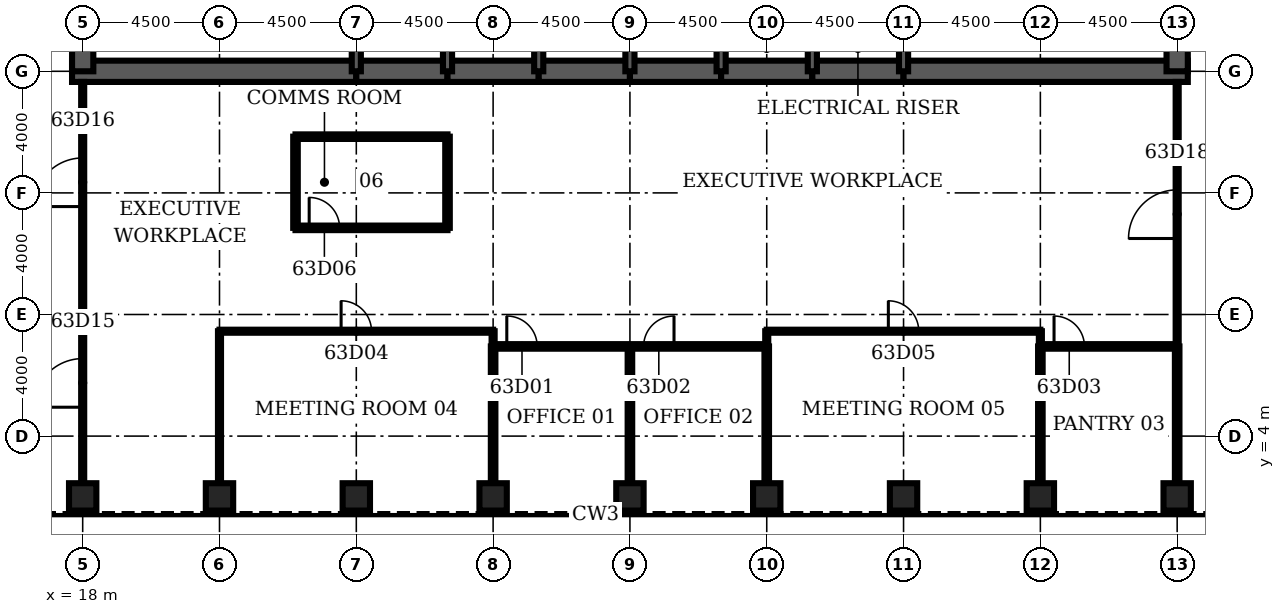
"""IFC4 building model, lengths in metres.
Left out: names, types, materials, properties, quantities, classifications, styles, units other than length and angle.
Written with IfcOpenShell. Run it as: python <this file> out.ifc"""

import sys

from ifc_helpers import new_model, si_unit, direction, frame, frame_2d, origin, origin_2d, place, context, subcontext, project, spatial, rectangle, hollow_rectangle, extrude, element, fill, save


model = new_model("IFC4")
c1 = context("Model", 3, precision=1e-05, world=origin(), true_north=direction((0.0, 1.0)))
c2 = subcontext(c1, "Body", "Model", "MODEL_VIEW")
j1 = project(units=[si_unit("LENGTHUNIT", "METRE"), si_unit("PLANEANGLEUNIT", "RADIAN")], contexts=[c1])
p1 = place(None, origin())
s1 = spatial("IfcSite", under=j1, at=p1, CompositionType="ELEMENT")
p2 = place(p1, origin())
s2 = spatial("IfcBuilding", under=s1, at=p2, CompositionType="ELEMENT")
p3 = place(p2, frame((0.0, 0.0, 279.5)))
s3 = spatial("IfcBuildingStorey", under=s2, at=p3, CompositionType="ELEMENT", Elevation=279.5)
for number, where, z_axis, x_axis in (
    (1, (18.0, 2.0, 0.0), (0.0, 0.0, 1.0), (0.0, 1.0, 0.0)),
    (2, (22.5, 2.0, 0.0), (0.0, 0.0, 1.0), (0.0, 1.0, 0.0)),
    (3, (27.0, 2.0, 0.0), (0.0, 0.0, 1.0), (0.0, 1.0, 0.0)),
    (4, (31.5, 2.0, 0.0), (0.0, 0.0, 1.0), (0.0, 1.0, 0.0)),
    (5, (36.0, 2.0, 0.0), (0.0, 0.0, 1.0), (0.0, 1.0, 0.0)),
    (6, (40.5, 2.0, 0.0), (0.0, 0.0, 1.0), (0.0, 1.0, 0.0)),
    (7, (45.0, 2.0, 0.0), (0.0, 0.0, 1.0), (0.0, 1.0, 0.0)),
    (8, (49.5, 2.0, 0.0), (0.0, 0.0, 1.0), (0.0, 1.0, 0.0)),
    (9, (54.0, 2.0, 0.0), (0.0, 0.0, 1.0), (0.0, 1.0, 0.0)),
):
    element("IfcColumn", number, at=place(p3, frame(where, z_axis=z_axis, x_axis=x_axis)), inside=s3, PredefinedType="COLUMN", context=c2, shape_type="SweptSolid", body=[
        extrude(hollow_rectangle(XDim=0.9, YDim=0.9, WallThickness=0.07, at=origin_2d()), origin(), (0.0, 0.0, 1.0), 4.2),
    ])
p4 = place(p3, frame((17.65, 16.0, 0.0), z_axis=(0.0, 0.0, 1.0), x_axis=(1.0, 0.0, 0.0)))
e10 = element("IfcWall", 10, at=p4, inside=s3, PredefinedType="SHEAR", context=c2, shape_type="SweptSolid", body=[
    extrude(rectangle(XDim=9.35, YDim=0.7, at=frame_2d((4.675, 0.0))), origin(), (0.0, 0.0, 1.0), 4.2),
])
for number, where, z_axis, x_axis in (
    (11, (27.0, 16.0, 0.0), (0.0, 0.0, 1.0), (1.0, 0.0, 0.0)),
    (12, (30.0, 16.0, 0.0), (0.0, 0.0, 1.0), (1.0, 0.0, 0.0)),
    (13, (33.0, 16.0, 0.0), (0.0, 0.0, 1.0), (1.0, 0.0, 0.0)),
    (14, (36.0, 16.0, 0.0), (0.0, 0.0, 1.0), (1.0, 0.0, 0.0)),
    (15, (39.0, 16.0, 0.0), (0.0, 0.0, 1.0), (1.0, 0.0, 0.0)),
    (16, (42.0, 16.0, 0.0), (0.0, 0.0, 1.0), (1.0, 0.0, 0.0)),
):
    element("IfcWall", number, at=place(p3, frame(where, z_axis=z_axis, x_axis=x_axis)), inside=s3, PredefinedType="SHEAR", context=c2, shape_type="SweptSolid", body=[
        extrude(rectangle(XDim=3.0, YDim=0.7, at=frame_2d((1.5, 0.0))), origin(), (0.0, 0.0, 1.0), 4.2),
    ])
p5 = place(p3, frame((45.0, 16.0, 0.0), z_axis=(0.0, 0.0, 1.0), x_axis=(1.0, 0.0, 0.0)))
e17 = element("IfcWall", 17, at=p5, inside=s3, PredefinedType="SHEAR", context=c2, shape_type="SweptSolid", body=[
    extrude(rectangle(XDim=9.35, YDim=0.7, at=frame_2d((4.675, 0.0))), origin(), (0.0, 0.0, 1.0), 4.2),
])
for number, where, z_axis, x_axis in (
    (18, (18.0, 19.2, 0.0), (0.0, 0.0, 1.0), (0.0, -1.0, 0.0)),
    (19, (54.0, 16.0, 0.0), (0.0, 0.0, 1.0), (0.0, 1.0, 0.0)),
):
    element("IfcWall", number, at=place(p3, frame(where, z_axis=z_axis, x_axis=x_axis)), inside=s3, PredefinedType="SHEAR", context=c2, shape_type="SweptSolid", body=[
        extrude(rectangle(XDim=3.2, YDim=0.7, at=frame_2d((1.6, 0.0))), origin(), (0.0, 0.0, 1.0), 4.2),
    ])
for number, where, z_axis, x_axis in (
    (20, (27.0, 16.0, 0.0), (0.0, 0.0, 1.0), (0.0, 1.0, 0.0)),
    (21, (30.0, 16.0, 0.0), (0.0, 0.0, 1.0), (0.0, 1.0, 0.0)),
    (22, (33.0, 16.0, 0.0), (0.0, 0.0, 1.0), (0.0, 1.0, 0.0)),
    (23, (36.0, 16.0, 0.0), (0.0, 0.0, 1.0), (0.0, 1.0, 0.0)),
    (24, (39.0, 16.0, 0.0), (0.0, 0.0, 1.0), (0.0, 1.0, 0.0)),
    (25, (42.0, 16.0, 0.0), (0.0, 0.0, 1.0), (0.0, 1.0, 0.0)),
    (26, (45.0, 16.0, 0.0), (0.0, 0.0, 1.0), (0.0, 1.0, 0.0)),
):
    element("IfcWall", number, at=place(p3, frame(where, z_axis=z_axis, x_axis=x_axis)), inside=s3, PredefinedType="SOLIDWALL", context=c2, shape_type="SweptSolid", body=[
        extrude(rectangle(XDim=3.2, YDim=0.3, at=frame_2d((1.6, 0.0))), origin(), (0.0, 0.0, 1.0), 4.2),
    ])
p6 = place(p3, frame((31.5, 6.95, 0.0), z_axis=(0.0, 0.0, 1.0), x_axis=(1.0, 0.0, 0.0)))
e27 = element("IfcWall", 27, at=p6, inside=s3, PredefinedType="PARTITIONING", context=c2, shape_type="SweptSolid", body=[
    extrude(rectangle(XDim=9.0, YDim=0.15, at=frame_2d((4.5, 0.0))), origin(), (0.0, 0.0, 1.0), 3.0),
])
p7 = place(p6, frame((0.45, 0.0, 0.0)))
e28 = element("IfcOpeningElement", 28, at=p7, cuts=e27, PredefinedType="OPENING", context=c2, shape_type="SweptSolid", body=[
    extrude(rectangle(XDim=1.0, YDim=2.1, at=frame_2d((0.5, 1.05))), frame((0.0, 0.085, 0.0), z_axis=(0.0, -1.0, 0.0), x_axis=(1.0, 0.0, 0.0)), (0.0, 0.0, 1.0), 0.17),
])
p8 = place(p6, frame((4.95, 0.0, 0.0)))
e29 = element("IfcOpeningElement", 29, at=p8, cuts=e27, PredefinedType="OPENING", context=c2, shape_type="SweptSolid", body=[
    extrude(rectangle(XDim=1.0, YDim=2.1, at=frame_2d((0.5, 1.05))), frame((0.0, 0.085, 0.0), z_axis=(0.0, -1.0, 0.0), x_axis=(1.0, 0.0, 0.0)), (0.0, 0.0, 1.0), 0.17),
])
p9 = place(p3, frame((49.5, 6.95, 0.0), z_axis=(0.0, 0.0, 1.0), x_axis=(1.0, 0.0, 0.0)))
e30 = element("IfcWall", 30, at=p9, inside=s3, PredefinedType="PARTITIONING", context=c2, shape_type="SweptSolid", body=[
    extrude(rectangle(XDim=4.5, YDim=0.15, at=frame_2d((2.25, 0.0))), origin(), (0.0, 0.0, 1.0), 3.0),
])
p10 = place(p9, frame((0.45, 0.0, 0.0)))
e31 = element("IfcOpeningElement", 31, at=p10, cuts=e30, PredefinedType="OPENING", context=c2, shape_type="SweptSolid", body=[
    extrude(rectangle(XDim=1.0, YDim=2.1, at=frame_2d((0.5, 1.05))), frame((0.0, 0.085, 0.0), z_axis=(0.0, -1.0, 0.0), x_axis=(1.0, 0.0, 0.0)), (0.0, 0.0, 1.0), 0.17),
])
p11 = place(p3, frame((22.5, 7.45, 0.0), z_axis=(0.0, 0.0, 1.0), x_axis=(1.0, 0.0, 0.0)))
e32 = element("IfcWall", 32, at=p11, inside=s3, PredefinedType="PARTITIONING", context=c2, shape_type="SweptSolid", body=[
    extrude(rectangle(XDim=9.0, YDim=0.1, at=frame_2d((4.5, 0.0))), origin(), (0.0, 0.0, 1.0), 3.0),
])
p12 = place(p11, frame((4.0, 0.0, 0.0)))
e33 = element("IfcOpeningElement", 33, at=p12, cuts=e32, PredefinedType="OPENING", context=c2, shape_type="SweptSolid", body=[
    extrude(rectangle(XDim=1.0, YDim=2.1, at=frame_2d((0.5, 1.05))), frame((0.0, 0.06, 0.0), z_axis=(0.0, -1.0, 0.0), x_axis=(1.0, 0.0, 0.0)), (0.0, 0.0, 1.0), 0.12),
])
p13 = place(p3, frame((40.5, 7.45, 0.0), z_axis=(0.0, 0.0, 1.0), x_axis=(1.0, 0.0, 0.0)))
e34 = element("IfcWall", 34, at=p13, inside=s3, PredefinedType="PARTITIONING", context=c2, shape_type="SweptSolid", body=[
    extrude(rectangle(XDim=9.0, YDim=0.1, at=frame_2d((4.5, 0.0))), origin(), (0.0, 0.0, 1.0), 3.0),
])
p14 = place(p13, frame((4.0, 0.0, 0.0)))
e35 = element("IfcOpeningElement", 35, at=p14, cuts=e34, PredefinedType="OPENING", context=c2, shape_type="SweptSolid", body=[
    extrude(rectangle(XDim=1.0, YDim=2.1, at=frame_2d((0.5, 1.05))), frame((0.0, 0.06, 0.0), z_axis=(0.0, -1.0, 0.0), x_axis=(1.0, 0.0, 0.0)), (0.0, 0.0, 1.0), 0.12),
])
p15 = place(p3, frame((25.0, 10.85, 0.0), z_axis=(0.0, 0.0, 1.0), x_axis=(1.0, 0.0, 0.0)))
e36 = element("IfcWall", 36, at=p15, inside=s3, PredefinedType="PARTITIONING", context=c2, shape_type="SweptSolid", body=[
    extrude(rectangle(XDim=5.0, YDim=0.15, at=frame_2d((2.5, 0.0))), origin(), (0.0, 0.0, 1.0), 3.0),
])
p16 = place(p15, frame((0.45, 0.0, 0.0)))
e37 = element("IfcOpeningElement", 37, at=p16, cuts=e36, PredefinedType="OPENING", context=c2, shape_type="SweptSolid", body=[
    extrude(rectangle(XDim=1.0, YDim=2.1, at=frame_2d((0.5, 1.05))), frame((0.0, 0.085, 0.0), z_axis=(0.0, -1.0, 0.0), x_axis=(1.0, 0.0, 0.0)), (0.0, 0.0, 1.0), 0.17),
])
p17 = place(p3, frame((25.0, 13.85, 0.0), z_axis=(0.0, 0.0, 1.0), x_axis=(1.0, 0.0, 0.0)))
e38 = element("IfcWall", 38, at=p17, inside=s3, PredefinedType="PARTITIONING", context=c2, shape_type="SweptSolid", body=[
    extrude(rectangle(XDim=5.0, YDim=0.15, at=frame_2d((2.5, 0.0))), origin(), (0.0, 0.0, 1.0), 3.0),
])
p18 = place(p3, frame((18.0, 2.45, 0.0), z_axis=(0.0, 0.0, 1.0), x_axis=(0.0, 1.0, 0.0)))
e39 = element("IfcWall", 39, at=p18, inside=s3, PredefinedType="PARTITIONING", context=c2, shape_type="SweptSolid", body=[
    extrude(rectangle(XDim=13.2, YDim=0.1, at=frame_2d((6.6, 0.0))), origin(), (0.0, 0.0, 1.0), 3.0),
])
p19 = place(p18, frame((2.5, 0.0, 0.0)))
e40 = element("IfcOpeningElement", 40, at=p19, cuts=e39, PredefinedType="OPENING", context=c2, shape_type="SweptSolid", body=[
    extrude(rectangle(XDim=1.6, YDim=2.1, at=frame_2d((0.8, 1.05))), frame((0.0, 0.06, 0.0), z_axis=(0.0, -1.0, 0.0), x_axis=(1.0, 0.0, 0.0)), (0.0, 0.0, 1.0), 0.12),
])
p20 = place(p18, frame((9.1, 0.0, 0.0)))
e41 = element("IfcOpeningElement", 41, at=p20, cuts=e39, PredefinedType="OPENING", context=c2, shape_type="SweptSolid", body=[
    extrude(rectangle(XDim=1.6, YDim=2.1, at=frame_2d((0.8, 1.05))), frame((0.0, 0.06, 0.0), z_axis=(0.0, -1.0, 0.0), x_axis=(1.0, 0.0, 0.0)), (0.0, 0.0, 1.0), 0.12),
])
p21 = place(p3, frame((22.5, 2.45, 0.0), z_axis=(0.0, 0.0, 1.0), x_axis=(0.0, 1.0, 0.0)))
e42 = element("IfcWall", 42, at=p21, inside=s3, PredefinedType="PARTITIONING", context=c2, shape_type="SweptSolid", body=[
    extrude(rectangle(XDim=5.0, YDim=0.1, at=frame_2d((2.5, 0.0))), origin(), (0.0, 0.0, 1.0), 3.0),
])
for number, where, z_axis, x_axis in (
    (43, (25.0, 10.85, 0.0), (0.0, 0.0, 1.0), (0.0, 1.0, 0.0)),
    (44, (30.0, 10.85, 0.0), (0.0, 0.0, 1.0), (0.0, 1.0, 0.0)),
):
    element("IfcWall", number, at=place(p3, frame(where, z_axis=z_axis, x_axis=x_axis)), inside=s3, PredefinedType="PARTITIONING", context=c2, shape_type="SweptSolid", body=[
        extrude(rectangle(XDim=3.0, YDim=0.15, at=frame_2d((1.5, 0.0))), origin(), (0.0, 0.0, 1.0), 3.0),
    ])
p22 = place(p3, frame((31.5, 2.45, 0.0), z_axis=(0.0, 0.0, 1.0), x_axis=(0.0, 1.0, 0.0)))
e45 = element("IfcWall", 45, at=p22, inside=s3, PredefinedType="PARTITIONING", context=c2, shape_type="SweptSolid", body=[
    extrude(rectangle(XDim=4.5, YDim=0.15, at=frame_2d((2.25, 0.0))), origin(), (0.0, 0.0, 1.0), 3.0),
])
p23 = place(p3, frame((31.5, 6.95, 0.0), z_axis=(0.0, 0.0, 1.0), x_axis=(0.0, 1.0, 0.0)))
e46 = element("IfcWall", 46, at=p23, inside=s3, PredefinedType="PARTITIONING", context=c2, shape_type="SweptSolid", body=[
    extrude(rectangle(XDim=0.5, YDim=0.1, at=frame_2d((0.25, 0.0))), origin(), (0.0, 0.0, 1.0), 3.0),
])
for number, where, z_axis, x_axis in (
    (47, (36.0, 2.45, 0.0), (0.0, 0.0, 1.0), (0.0, 1.0, 0.0)),
    (48, (40.5, 2.45, 0.0), (0.0, 0.0, 1.0), (0.0, 1.0, 0.0)),
):
    element("IfcWall", number, at=place(p3, frame(where, z_axis=z_axis, x_axis=x_axis)), inside=s3, PredefinedType="PARTITIONING", context=c2, shape_type="SweptSolid", body=[
        extrude(rectangle(XDim=4.5, YDim=0.15, at=frame_2d((2.25, 0.0))), origin(), (0.0, 0.0, 1.0), 3.0),
    ])
p24 = place(p3, frame((40.5, 6.95, 0.0), z_axis=(0.0, 0.0, 1.0), x_axis=(0.0, 1.0, 0.0)))
e49 = element("IfcWall", 49, at=p24, inside=s3, PredefinedType="PARTITIONING", context=c2, shape_type="SweptSolid", body=[
    extrude(rectangle(XDim=0.5, YDim=0.1, at=frame_2d((0.25, 0.0))), origin(), (0.0, 0.0, 1.0), 3.0),
])
p25 = place(p3, frame((49.5, 2.45, 0.0), z_axis=(0.0, 0.0, 1.0), x_axis=(0.0, 1.0, 0.0)))
e50 = element("IfcWall", 50, at=p25, inside=s3, PredefinedType="PARTITIONING", context=c2, shape_type="SweptSolid", body=[
    extrude(rectangle(XDim=4.5, YDim=0.15, at=frame_2d((2.25, 0.0))), origin(), (0.0, 0.0, 1.0), 3.0),
])
p26 = place(p3, frame((49.5, 6.95, 0.0), z_axis=(0.0, 0.0, 1.0), x_axis=(0.0, 1.0, 0.0)))
e51 = element("IfcWall", 51, at=p26, inside=s3, PredefinedType="PARTITIONING", context=c2, shape_type="SweptSolid", body=[
    extrude(rectangle(XDim=0.5, YDim=0.1, at=frame_2d((0.25, 0.0))), origin(), (0.0, 0.0, 1.0), 3.0),
])
p27 = place(p3, frame((54.0, 2.45, 0.0), z_axis=(0.0, 0.0, 1.0), x_axis=(0.0, 1.0, 0.0)))
e52 = element("IfcWall", 52, at=p27, inside=s3, PredefinedType="PARTITIONING", context=c2, shape_type="SweptSolid", body=[
    extrude(rectangle(XDim=4.5, YDim=0.15, at=frame_2d((2.25, 0.0))), origin(), (0.0, 0.0, 1.0), 3.0),
])
p28 = place(p3, frame((54.0, 6.95, 0.0), z_axis=(0.0, 0.0, 1.0), x_axis=(0.0, 1.0, 0.0)))
e53 = element("IfcWall", 53, at=p28, inside=s3, PredefinedType="PARTITIONING", context=c2, shape_type="SweptSolid", body=[
    extrude(rectangle(XDim=8.7, YDim=0.1, at=frame_2d((4.35, 0.0))), origin(), (0.0, 0.0, 1.0), 3.0),
])
p29 = place(p28, frame((3.55, 0.0, 0.0)))
e54 = element("IfcOpeningElement", 54, at=p29, cuts=e53, PredefinedType="OPENING", context=c2, shape_type="SweptSolid", body=[
    extrude(rectangle(XDim=1.6, YDim=2.1, at=frame_2d((0.8, 1.05))), frame((0.0, 0.06, 0.0), z_axis=(0.0, -1.0, 0.0), x_axis=(1.0, 0.0, 0.0)), (0.0, 0.0, 1.0), 0.12),
])
p30 = place(p7, origin())
e55 = element("IfcDoor", 55, at=p30, inside=s3, OperationType="SINGLE_SWING_LEFT", PredefinedType="DOOR", context=c2, shape_type="SweptSolid", body=[
    extrude(rectangle(XDim=1.0, YDim=2.1, at=frame_2d((0.5, 1.05))), frame((0.0, 0.025, 0.0), z_axis=(0.0, -1.0, 0.0), x_axis=(1.0, 0.0, 0.0)), (0.0, 0.0, 1.0), 0.05),
])
fill(e28, e55)
p31 = place(p8, origin())
e56 = element("IfcDoor", 56, at=p31, inside=s3, OperationType="SINGLE_SWING_RIGHT", PredefinedType="DOOR", context=c2, shape_type="SweptSolid", body=[
    extrude(rectangle(XDim=1.0, YDim=2.1, at=frame_2d((0.5, 1.05))), frame((0.0, 0.025, 0.0), z_axis=(0.0, -1.0, 0.0), x_axis=(1.0, 0.0, 0.0)), (0.0, 0.0, 1.0), 0.05),
])
fill(e29, e56)
p32 = place(p10, origin())
e57 = element("IfcDoor", 57, at=p32, inside=s3, OperationType="SINGLE_SWING_LEFT", PredefinedType="DOOR", context=c2, shape_type="SweptSolid", body=[
    extrude(rectangle(XDim=1.0, YDim=2.1, at=frame_2d((0.5, 1.05))), frame((0.0, 0.025, 0.0), z_axis=(0.0, -1.0, 0.0), x_axis=(1.0, 0.0, 0.0)), (0.0, 0.0, 1.0), 0.05),
])
fill(e31, e57)
p33 = place(p12, origin())
e58 = element("IfcDoor", 58, at=p33, inside=s3, OperationType="SINGLE_SWING_LEFT", PredefinedType="DOOR", context=c2, shape_type="SweptSolid", body=[
    extrude(rectangle(XDim=1.0, YDim=2.1, at=frame_2d((0.5, 1.05))), frame((0.0, 0.025, 0.0), z_axis=(0.0, -1.0, 0.0), x_axis=(1.0, 0.0, 0.0)), (0.0, 0.0, 1.0), 0.05),
])
fill(e33, e58)
p34 = place(p14, origin())
e59 = element("IfcDoor", 59, at=p34, inside=s3, OperationType="SINGLE_SWING_LEFT", PredefinedType="DOOR", context=c2, shape_type="SweptSolid", body=[
    extrude(rectangle(XDim=1.0, YDim=2.1, at=frame_2d((0.5, 1.05))), frame((0.0, 0.025, 0.0), z_axis=(0.0, -1.0, 0.0), x_axis=(1.0, 0.0, 0.0)), (0.0, 0.0, 1.0), 0.05),
])
fill(e35, e59)
p35 = place(p16, origin())
e60 = element("IfcDoor", 60, at=p35, inside=s3, OperationType="SINGLE_SWING_LEFT", PredefinedType="DOOR", context=c2, shape_type="SweptSolid", body=[
    extrude(rectangle(XDim=1.0, YDim=2.1, at=frame_2d((0.5, 1.05))), frame((0.0, 0.025, 0.0), z_axis=(0.0, -1.0, 0.0), x_axis=(1.0, 0.0, 0.0)), (0.0, 0.0, 1.0), 0.05),
])
fill(e37, e60)
p36 = place(p19, origin())
e61 = element("IfcDoor", 61, at=p36, inside=s3, OperationType="SINGLE_SWING_LEFT", PredefinedType="DOOR", context=c2, shape_type="SweptSolid", body=[
    extrude(rectangle(XDim=1.6, YDim=2.1, at=frame_2d((0.8, 1.05))), frame((0.0, 0.025, 0.0), z_axis=(0.0, -1.0, 0.0), x_axis=(1.0, 0.0, 0.0)), (0.0, 0.0, 1.0), 0.05),
])
fill(e40, e61)
p37 = place(p20, origin())
e62 = element("IfcDoor", 62, at=p37, inside=s3, OperationType="SINGLE_SWING_LEFT", PredefinedType="DOOR", context=c2, shape_type="SweptSolid", body=[
    extrude(rectangle(XDim=1.6, YDim=2.1, at=frame_2d((0.8, 1.05))), frame((0.0, 0.025, 0.0), z_axis=(0.0, -1.0, 0.0), x_axis=(1.0, 0.0, 0.0)), (0.0, 0.0, 1.0), 0.05),
])
fill(e41, e62)
p38 = place(p29, origin())
e63 = element("IfcDoor", 63, at=p38, inside=s3, OperationType="SINGLE_SWING_LEFT", PredefinedType="DOOR", context=c2, shape_type="SweptSolid", body=[
    extrude(rectangle(XDim=1.6, YDim=2.1, at=frame_2d((0.8, 1.05))), frame((0.0, 0.025, 0.0), z_axis=(0.0, -1.0, 0.0), x_axis=(1.0, 0.0, 0.0)), (0.0, 0.0, 1.0), 0.05),
])
fill(e54, e63)
save(model, sys.argv[1])
